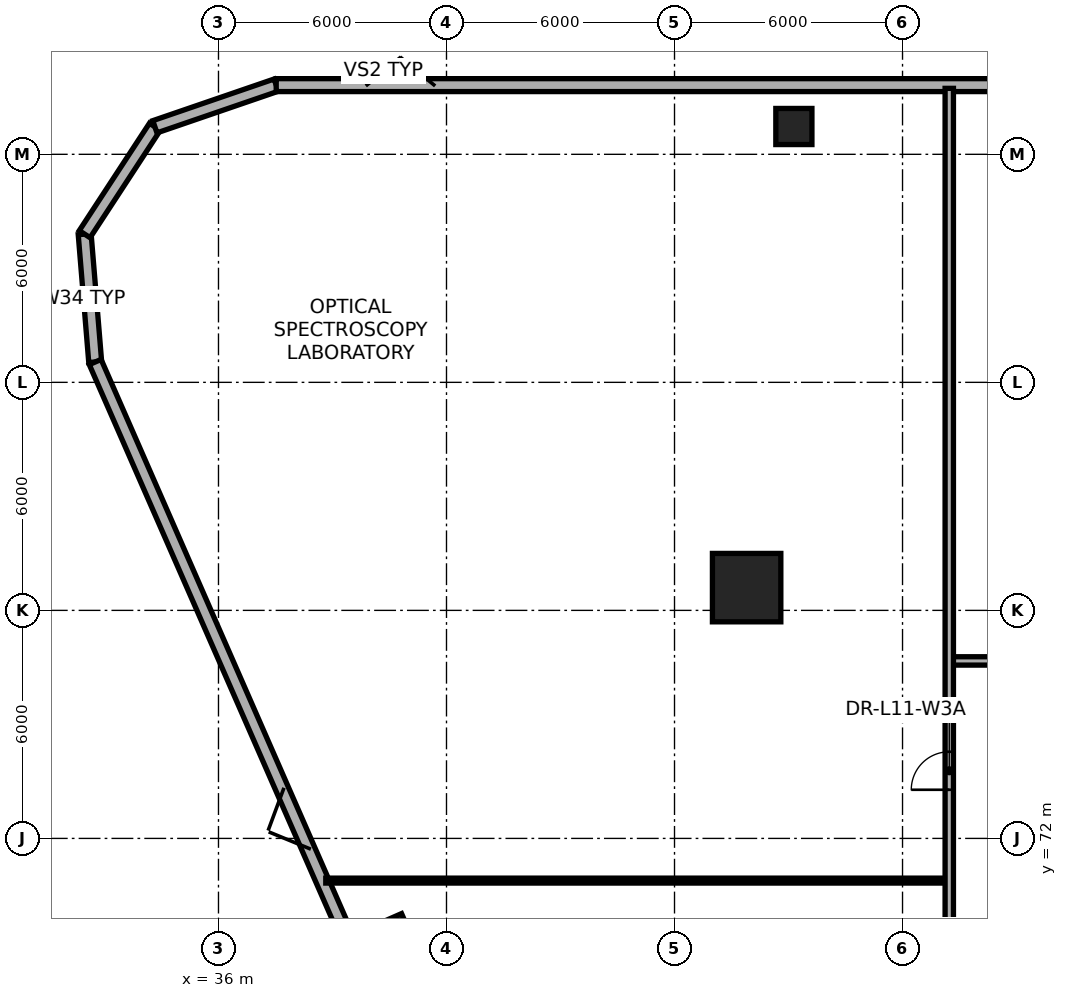
"""IFC4 building model, lengths in metres.
Left out: names, types, materials, properties, quantities, classifications, styles, units other than length and angle.
Written with IfcOpenShell. Run it as: python <this file> out.ifc"""

import sys

from ifc_helpers import new_model, si_unit, direction, frame, frame_2d, origin, origin_2d, place, context, subcontext, project, spatial, rectangle, extrude, element, fill, save


model = new_model("IFC4")
c1 = context("Model", 3, precision=1e-05, world=origin(), true_north=direction((0.0, 1.0)))
c2 = subcontext(c1, "Body", "Model", "MODEL_VIEW")
j1 = project(units=[si_unit("LENGTHUNIT", "METRE"), si_unit("PLANEANGLEUNIT", "RADIAN")], contexts=[c1])
p1 = place(None, origin())
s1 = spatial("IfcSite", under=j1, at=p1, CompositionType="ELEMENT")
p2 = place(p1, origin())
s2 = spatial("IfcBuilding", under=s1, at=p2, CompositionType="ELEMENT")
p3 = place(p2, frame((0.0, 0.0, 44.7)))
s3 = spatial("IfcBuildingStorey", under=s2, at=p3, CompositionType="ELEMENT", Elevation=44.7)
p4 = place(p3, frame((49.898, 78.599, 0.0), z_axis=(0.0, 0.0, 1.0), x_axis=(1.0, 0.0, 0.0)))
e1 = element("IfcColumn", 1, at=p4, inside=s3, PredefinedType="COLUMN", context=c2, shape_type="SweptSolid", body=[
    extrude(rectangle(XDim=1.8, YDim=1.8, at=origin_2d()), origin(), (0.0, 0.0, 1.0), 3.65),
])
p5 = place(p3, frame((51.092, 90.793, 0.003), z_axis=(0.026841076243, -0.033534611465, 0.999077067328), x_axis=(-0.780716755404, -0.624885067698, 0.0)))
e2 = element("IfcColumn", 2, at=p5, inside=s3, PredefinedType="COLUMN", context=c2, shape_type="SweptSolid", body=[
    extrude(rectangle(XDim=0.95, YDim=0.95, at=origin_2d()), origin(), (0.0, 0.0, 1.0), 3.647),
])
p6 = place(p3, frame((40.501, 69.406, 0.003), z_axis=(0.039229493406, -0.00569028488, 0.999214024874), x_axis=(0.963398005451, 0.26560461156, -0.036310789174)))
e3 = element("IfcColumn", 3, at=p6, inside=s3, PredefinedType="COLUMN", context=c2, shape_type="SweptSolid", body=[
    extrude(rectangle(XDim=0.95, YDim=0.95, at=origin_2d()), origin(), (0.0, 0.0, 1.0), 3.647),
])
p7 = place(p3, frame((32.756, 84.535, 0.0), z_axis=(0.0, 0.0, 1.0), x_axis=(-0.082010022953, 0.996631504687, 0.0)))
e4 = element("IfcWall", 4, at=p7, inside=s3, PredefinedType="STANDARD", context=c2, shape_type="SweptSolid", body=[
    extrude(rectangle(XDim=3.376, YDim=0.34, at=frame_2d((1.688, 0.0))), origin(), (0.0, 0.0, 1.0), 3.375),
])
p8 = place(p3, frame((32.479, 87.899, 0.0), z_axis=(0.0, 0.0, 1.0), x_axis=(0.547200646652, 0.837001464935, 0.0)))
e5 = element("IfcWall", 5, at=p8, inside=s3, PredefinedType="STANDARD", context=c2, shape_type="SweptSolid", body=[
    extrude(rectangle(XDim=3.376, YDim=0.34, at=frame_2d((1.688, 0.0))), origin(), (0.0, 0.0, 1.0), 3.375),
])
p9 = place(p3, frame((34.326, 90.725, 0.0), z_axis=(0.0, 0.0, 1.0), x_axis=(0.945840034207, 0.324633069314, 0.0)))
e6 = element("IfcWall", 6, at=p9, inside=s3, PredefinedType="STANDARD", context=c2, shape_type="SweptSolid", body=[
    extrude(rectangle(XDim=3.376, YDim=0.34, at=frame_2d((1.688, 0.0))), origin(), (0.0, 0.0, 1.0), 3.375),
])
p10 = place(p3, frame((37.519, 91.821, 0.0), z_axis=(0.0, 0.0, 1.0), x_axis=(1.0, 0.0, 0.0)))
e7 = element("IfcWall", 7, at=p10, inside=s3, PredefinedType="STANDARD", context=c2, shape_type="SweptSolid", body=[
    extrude(rectangle(XDim=56.961, YDim=0.34, at=frame_2d((28.481, 0.0))), origin(), (0.0, 0.0, 1.0), 0.85),
])
p11 = place(p3, frame((61.237, 19.49, 0.0), z_axis=(0.0, 0.0, 1.0), x_axis=(-0.401097303432, 0.916035454106, 0.0)))
e8 = element("IfcWall", 8, at=p11, inside=s3, PredefinedType="STANDARD", context=c2, shape_type="SweptSolid", body=[
    extrude(rectangle(XDim=71.007, YDim=0.34, at=frame_2d((35.503, 0.0))), origin(), (0.0, 0.0, 1.0), 0.85),
])
p12 = place(p3, frame((55.23, 76.67, 0.0), z_axis=(0.0, 0.0, 1.0), x_axis=(1.0, 0.0, 0.0)))
e9 = element("IfcWall", 9, at=p12, inside=s3, PredefinedType="PARTITIONING", context=c2, shape_type="SweptSolid", body=[
    extrude(rectangle(XDim=40.478, YDim=0.22, at=frame_2d((20.239, 0.0))), origin(), (0.0, 0.0, 1.0), 2.505),
])
p13 = place(p12, frame((4.33, 0.0, 0.0)))
e10 = element("IfcOpeningElement", 10, at=p13, cuts=e9, PredefinedType="OPENING", context=c2, shape_type="SweptSolid", body=[
    extrude(rectangle(XDim=0.98, YDim=2.1, at=frame_2d((0.49, 1.05))), frame((0.0, 0.12, 0.0), z_axis=(0.0, -1.0, 0.0), x_axis=(1.0, 0.0, 0.0)), (0.0, 0.0, 1.0), 0.24),
])
p14 = place(p12, frame((7.155, 0.0, 0.0)))
e11 = element("IfcOpeningElement", 11, at=p14, cuts=e9, PredefinedType="OPENING", context=c2, shape_type="SweptSolid", body=[
    extrude(rectangle(XDim=0.98, YDim=2.1, at=frame_2d((0.49, 1.05))), frame((0.0, 0.12, 0.0), z_axis=(0.0, -1.0, 0.0), x_axis=(1.0, 0.0, 0.0)), (0.0, 0.0, 1.0), 0.24),
])
p15 = place(p12, frame((24.164, 0.0, 0.0)))
e12 = element("IfcOpeningElement", 12, at=p15, cuts=e9, PredefinedType="OPENING", context=c2, shape_type="SweptSolid", body=[
    extrude(rectangle(XDim=1.0, YDim=2.1, at=frame_2d((0.5, 1.05))), frame((0.0, 0.12, 0.0), z_axis=(0.0, -1.0, 0.0), x_axis=(1.0, 0.0, 0.0)), (0.0, 0.0, 1.0), 0.24),
])
p16 = place(p3, frame((38.823, 70.89, 0.0), z_axis=(0.0, 0.0, 1.0), x_axis=(1.0, 0.0, 0.0)))
e13 = element("IfcWall", 13, at=p16, inside=s3, PredefinedType="PARTITIONING", context=c2, shape_type="SweptSolid", body=[
    extrude(rectangle(XDim=16.407, YDim=0.13, at=frame_2d((8.203, 0.0))), origin(), (0.0, 0.0, 1.0), 2.505),
])
p17 = place(p3, frame((55.23, 59.33, 0.0), z_axis=(0.0, 0.0, 1.0), x_axis=(0.0, 1.0, 0.0)))
e14 = element("IfcWall", 14, at=p17, inside=s3, PredefinedType="PARTITIONING", context=c2, shape_type="SweptSolid", body=[
    extrude(rectangle(XDim=32.406, YDim=0.22, at=frame_2d((16.203, 0.0))), origin(), (0.0, 0.0, 1.0), 2.505),
])
p18 = place(p17, frame((2.39, 0.0, 0.0)))
e15 = element("IfcOpeningElement", 15, at=p18, cuts=e14, PredefinedType="OPENING", context=c2, shape_type="SweptSolid", body=[
    extrude(rectangle(XDim=1.0, YDim=2.1, at=frame_2d((0.5, 1.05))), frame((0.0, 0.12, 0.0), z_axis=(0.0, -1.0, 0.0), x_axis=(1.0, 0.0, 0.0)), (0.0, 0.0, 1.0), 0.24),
])
p19 = place(p17, frame((8.17, 0.0, 0.0)))
e16 = element("IfcOpeningElement", 16, at=p19, cuts=e14, PredefinedType="OPENING", context=c2, shape_type="SweptSolid", body=[
    extrude(rectangle(XDim=1.0, YDim=2.1, at=frame_2d((0.5, 1.05))), frame((0.0, 0.12, 0.0), z_axis=(0.0, -1.0, 0.0), x_axis=(1.0, 0.0, 0.0)), (0.0, 0.0, 1.0), 0.24),
])
p20 = place(p17, frame((13.95, 0.0, 0.0)))
e17 = element("IfcOpeningElement", 17, at=p20, cuts=e14, PredefinedType="OPENING", context=c2, shape_type="SweptSolid", body=[
    extrude(rectangle(XDim=1.0, YDim=2.1, at=frame_2d((0.5, 1.05))), frame((0.0, 0.12, 0.0), z_axis=(0.0, -1.0, 0.0), x_axis=(1.0, 0.0, 0.0)), (0.0, 0.0, 1.0), 0.24),
])
p21 = place(p20, origin())
e18 = element("IfcDoor", 18, at=p21, inside=s3, OperationType="SINGLE_SWING_LEFT", PredefinedType="DOOR", context=c2, shape_type="SweptSolid", body=[
    extrude(rectangle(XDim=1.0, YDim=2.1, at=frame_2d((0.5, 1.05))), frame((0.0, 0.025, 0.0), z_axis=(0.0, -1.0, 0.0), x_axis=(1.0, 0.0, 0.0)), (0.0, 0.0, 1.0), 0.05),
])
fill(e17, e18)
save(model, sys.argv[1])
